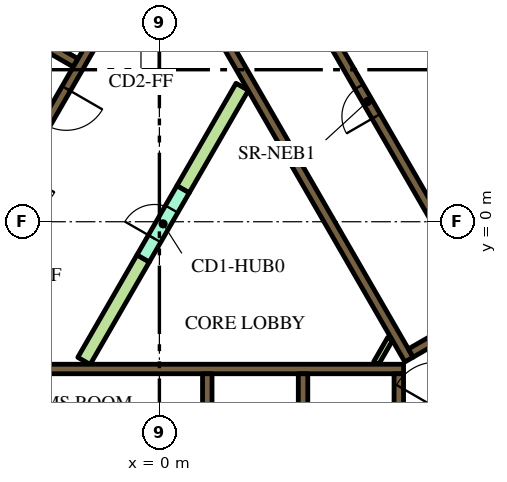
"""IFC4 building model, lengths in metres.
Left out: names, types, materials, properties, quantities, classifications, styles, units other than length and angle.
Written with IfcOpenShell. Run it as: python <this file> out.ifc"""

import sys

from ifc_helpers import new_model, si_unit, direction, frame, frame_2d, origin, place, context, subcontext, project, spatial, polyline, rectangle, outline, extrude, element, fill, save


model = new_model("IFC4")
c1 = context("Model", 3, precision=1e-05, world=origin(), true_north=direction((0.0, 1.0)))
c2 = subcontext(c1, "Body", "Model", "MODEL_VIEW")
j1 = project(units=[si_unit("LENGTHUNIT", "METRE"), si_unit("PLANEANGLEUNIT", "RADIAN")], contexts=[c1])
p1 = place(None, origin())
s1 = spatial("IfcSite", under=j1, at=p1, CompositionType="ELEMENT")
p2 = place(p1, origin())
s2 = spatial("IfcBuilding", under=s1, at=p2, CompositionType="ELEMENT")
p3 = place(p2, frame((0.0, 0.0, 111.0)))
s3 = spatial("IfcBuildingStorey", under=s2, at=p3, CompositionType="ELEMENT", Elevation=111.0)
p4 = place(p3, frame((6.711, 13.476, 0.0), z_axis=(0.0, 0.0, 1.0), x_axis=(0.500002723396, -0.866023831425, 0.0)))
e1 = element("IfcWall", 1, at=p4, inside=s3, PredefinedType="SOLIDWALL", context=c2, shape_type="SweptSolid", body=[
    extrude(rectangle(XDim=20.334, YDim=0.9, at=frame_2d((10.167, 0.0))), origin(), (0.0, 0.0, 1.0), 3.9),
])
p5 = place(p3, frame((-5.545, -3.875, 0.0), z_axis=(0.0, 0.0, 1.0), x_axis=(1.0, 0.0, 0.0)))
e2 = element("IfcWall", 2, at=p5, inside=s3, PredefinedType="SOLIDWALL", context=c2, shape_type="SweptSolid", body=[
    extrude(rectangle(XDim=11.97, YDim=0.25, at=frame_2d((5.985, 0.0))), origin(), (0.0, 0.0, 1.0), 3.9),
])
p6 = place(p3, frame((6.3, -7.268, 0.0), z_axis=(0.0, 0.0, 1.0), x_axis=(0.0, 1.0, 0.0)))
e3 = element("IfcWall", 3, at=p6, inside=s3, PredefinedType="SOLIDWALL", context=c2, shape_type="SweptSolid", body=[
    extrude(rectangle(XDim=3.268, YDim=0.25, at=frame_2d((1.634, 0.0))), origin(), (0.0, 0.0, 1.0), 3.9),
])
for number, where, z_axis, x_axis in (
    (4, (3.78, -4.0, 0.0), (0.0, 0.0, 1.0), (0.0, -1.0, 0.0)),
    (5, (1.26, -4.0, 0.0), (0.0, 0.0, 1.0), (0.0, -1.0, 0.0)),
):
    element("IfcWall", number, at=place(p3, frame(where, z_axis=z_axis, x_axis=x_axis)), inside=s3, PredefinedType="SOLIDWALL", context=c2, shape_type="SweptSolid", body=[
        extrude(rectangle(XDim=2.2, YDim=0.25, at=frame_2d((1.1, 0.0))), origin(), (0.0, 0.0, 1.0), 3.9),
    ])
p7 = place(p3, origin())
e6 = element("IfcWall", 6, at=p7, inside=s3, PredefinedType="SOLIDWALL", context=c2, shape_type="SweptSolid", body=[
    extrude(outline(polyline([(0.566, 6.725), (0.566, 6.875), (0.566, 6.875), (0.565, 6.875), (0.361, 6.875), (0.035, 7.439), (0.252, 7.564), (0.377, 7.348), (6.552, -3.348), (6.677, -3.564), (6.46, -3.689), (0.448, 6.725), (0.565, 6.725), (0.566, 6.725), (0.566, 6.725)])), origin(), (0.0, 0.0, 1.0), 3.9),
])
p8 = place(p3, frame((6.614, -3.456, 0.0), z_axis=(0.0, 0.0, 1.0), x_axis=(0.86602447079, 0.500001615989, 0.0)))
e7 = element("IfcWall", 7, at=p8, inside=s3, PredefinedType="SOLIDWALL", context=c2, shape_type="SweptSolid", body=[
    extrude(rectangle(XDim=3.154, YDim=0.25, at=frame_2d((1.577, 0.0))), origin(), (0.0, 0.0, 1.0), 3.9),
])
p9 = place(p3, frame((-8.06, -1.311, 0.0), z_axis=(0.0, 0.0, 1.0), x_axis=(0.50000273126, 0.866023826885, 0.0)))
e8 = element("IfcWall", 8, at=p9, inside=s3, PredefinedType="SOLIDWALL", context=c2, shape_type="SweptSolid", body=[
    extrude(rectangle(XDim=10.33, YDim=0.25, at=frame_2d((5.165, 0.0))), origin(), (0.0, 0.0, 1.0), 3.9),
])
p10 = place(p3, frame((-2.204, 4.182, 0.0), z_axis=(0.0, 0.0, 1.0), x_axis=(-0.866008176907, 0.50002983664, 0.0)))
e9 = element("IfcWall", 9, at=p10, inside=s3, PredefinedType="SOLIDWALL", context=c2, shape_type="SweptSolid", body=[
    extrude(rectangle(XDim=2.2, YDim=0.25, at=frame_2d((1.1, 0.0))), origin(), (0.0, 0.0, 1.0), 3.9),
])
p11 = place(p3, frame((5.705, -3.718, 0.0), z_axis=(0.0, 0.0, 1.0), x_axis=(0.499962090823, 0.866047289552, 0.0)))
e10 = element("IfcWall", 10, at=p11, inside=s3, PredefinedType="PARTITIONING", context=c2, shape_type="SweptSolid", body=[
    extrude(rectangle(XDim=0.735, YDim=0.15, at=frame_2d((0.367, 0.0))), origin(), (0.0, 0.0, 1.0), 2.75),
])
e11 = element("IfcWall", 11, at=p7, inside=s3, PredefinedType="PARTITIONING", context=c2, shape_type="SweptSolid", body=[
    extrude(outline(polyline([(-0.59, -0.872), (-0.265, -1.059), (-1.822, -3.756), (-2.147, -3.568), (-0.59, -0.872)])), origin(), (0.0, 0.0, 1.0), 2.75),
])
e12 = element("IfcWall", 12, at=p7, inside=s3, PredefinedType="PARTITIONING", context=c2, shape_type="SweptSolid", body=[
    extrude(outline(polyline([(2.017, 3.643), (2.342, 3.456), (0.785, 0.76), (0.46, 0.947), (2.017, 3.643)])), origin(), (0.0, 0.0, 1.0), 2.75),
])
p12 = place(p3, frame((11.553, -0.46, 0.0), z_axis=(0.0, 0.0, 1.0), x_axis=(-0.500006514828, 0.866021642414, 0.0)))
e13 = element("IfcWall", 13, at=p12, inside=s3, PredefinedType="SOLIDWALL", context=c2, shape_type="SweptSolid", body=[
    extrude(rectangle(XDim=12.35, YDim=0.25, at=frame_2d((6.175, 0.0))), origin(), (0.0, 0.0, 1.0), 3.9),
])
p13 = place(p12, frame((0.585, 0.0, 0.0)))
e14 = element("IfcOpeningElement", 14, at=p13, cuts=e13, PredefinedType="OPENING", context=c2, shape_type="SweptSolid", body=[
    extrude(rectangle(XDim=1.1, YDim=2.1, at=frame_2d((0.55, 1.05))), frame((0.0, 0.135, 0.0), z_axis=(0.0, -1.0, 0.0), x_axis=(1.0, 0.0, 0.0)), (0.0, 0.0, 1.0), 0.27),
])
p14 = place(p12, frame((3.105, 0.0, 0.0)))
e15 = element("IfcOpeningElement", 15, at=p14, cuts=e13, PredefinedType="OPENING", context=c2, shape_type="SweptSolid", body=[
    extrude(rectangle(XDim=1.1, YDim=2.1, at=frame_2d((0.55, 1.05))), frame((0.0, 0.135, 0.0), z_axis=(0.0, -1.0, 0.0), x_axis=(1.0, 0.0, 0.0)), (0.0, 0.0, 1.0), 0.27),
])
p15 = place(p12, frame((5.625, 0.0, 0.0)))
e16 = element("IfcOpeningElement", 16, at=p15, cuts=e13, PredefinedType="OPENING", context=c2, shape_type="SweptSolid", body=[
    extrude(rectangle(XDim=1.1, YDim=2.1, at=frame_2d((0.55, 1.05))), frame((0.0, 0.135, 0.0), z_axis=(0.0, -1.0, 0.0), x_axis=(1.0, 0.0, 0.0)), (0.0, 0.0, 1.0), 0.27),
])
p16 = place(p3, frame((8.565, -2.185, 0.0), z_axis=(0.0, 0.0, 1.0), x_axis=(-0.499997954832, 0.866026584559, 0.0)))
e17 = element("IfcWall", 17, at=p16, inside=s3, PredefinedType="SOLIDWALL", context=c2, shape_type="SweptSolid", body=[
    extrude(rectangle(XDim=12.35, YDim=0.25, at=frame_2d((6.175, 0.0))), origin(), (0.0, 0.0, 1.0), 3.9),
])
p17 = place(p16, frame((5.725, 0.0, 0.0)))
e18 = element("IfcOpeningElement", 18, at=p17, cuts=e17, PredefinedType="OPENING", context=c2, shape_type="SweptSolid", body=[
    extrude(rectangle(XDim=0.9, YDim=2.1, at=frame_2d((0.45, 1.05))), frame((0.0, 0.135, 0.0), z_axis=(0.0, -1.0, 0.0), x_axis=(1.0, 0.0, 0.0)), (0.0, 0.0, 1.0), 0.27),
])
p18 = place(p3, frame((-0.898, 6.194, 0.0), z_axis=(0.0, 0.0, 1.0), x_axis=(-0.499996202215, -0.866027596426, 0.0)))
e19 = element("IfcWall", 19, at=p18, inside=s3, PredefinedType="SOLIDWALL", context=c2, shape_type="SweptSolid", body=[
    extrude(rectangle(XDim=9.83, YDim=0.25, at=frame_2d((4.915, 0.0))), origin(), (0.0, 0.0, 1.0), 3.9),
])
p19 = place(p18, frame((0.585, 0.0, 0.0)))
e20 = element("IfcOpeningElement", 20, at=p19, cuts=e19, PredefinedType="OPENING", context=c2, shape_type="SweptSolid", body=[
    extrude(rectangle(XDim=1.1, YDim=2.1, at=frame_2d((0.55, 1.05))), frame((0.0, 0.135, 0.0), z_axis=(0.0, -1.0, 0.0), x_axis=(1.0, 0.0, 0.0)), (0.0, 0.0, 1.0), 0.27),
])
p20 = place(p18, frame((3.105, 0.0, 0.0)))
e21 = element("IfcOpeningElement", 21, at=p20, cuts=e19, PredefinedType="OPENING", context=c2, shape_type="SweptSolid", body=[
    extrude(rectangle(XDim=1.1, YDim=2.1, at=frame_2d((0.55, 1.05))), frame((0.0, 0.135, 0.0), z_axis=(0.0, -1.0, 0.0), x_axis=(1.0, 0.0, 0.0)), (0.0, 0.0, 1.0), 0.27),
])
p21 = place(p18, frame((5.625, 0.0, 0.0)))
e22 = element("IfcOpeningElement", 22, at=p21, cuts=e19, PredefinedType="OPENING", context=c2, shape_type="SweptSolid", body=[
    extrude(rectangle(XDim=1.1, YDim=2.1, at=frame_2d((0.55, 1.05))), frame((0.0, 0.135, 0.0), z_axis=(0.0, -1.0, 0.0), x_axis=(1.0, 0.0, 0.0)), (0.0, 0.0, 1.0), 0.27),
])
p22 = place(p18, frame((8.145, 0.0, 0.0)))
e23 = element("IfcOpeningElement", 23, at=p22, cuts=e19, PredefinedType="OPENING", context=c2, shape_type="SweptSolid", body=[
    extrude(rectangle(XDim=1.1, YDim=2.1, at=frame_2d((0.55, 1.05))), frame((0.0, 0.135, 0.0), z_axis=(0.0, -1.0, 0.0), x_axis=(1.0, 0.0, 0.0)), (0.0, 0.0, 1.0), 0.27),
])
p23 = place(p3, frame((7.053, -5.284, 0.0), z_axis=(0.0, 0.0, 1.0), x_axis=(0.500078061341, 0.865980330357, 0.0)))
e24 = element("IfcWall", 24, at=p23, inside=s3, PredefinedType="SOLIDWALL", context=c2, shape_type="SweptSolid", body=[
    extrude(rectangle(XDim=2.1, YDim=0.4, at=frame_2d((1.05, 0.0))), origin(), (0.0, 0.0, 1.0), 3.9),
])
p24 = place(p23, frame((0.45, 0.0, 0.0)))
e25 = element("IfcOpeningElement", 25, at=p24, cuts=e24, PredefinedType="OPENING", context=c2, shape_type="SweptSolid", body=[
    extrude(rectangle(XDim=1.2, YDim=2.1, at=frame_2d((0.6, 1.05))), frame((0.0, 0.21, 0.0), z_axis=(0.0, -1.0, 0.0), x_axis=(1.0, 0.0, 0.0)), (0.0, 0.0, 1.0), 0.42),
])
p25 = place(p3, frame((-0.427, -0.966, 0.0), z_axis=(0.0, 0.0, 1.0), x_axis=(0.49994051562, 0.866059744384, 0.0)))
e26 = element("IfcWall", 26, at=p25, inside=s3, PredefinedType="PARTITIONING", context=c2, shape_type="SweptSolid", body=[
    extrude(rectangle(XDim=2.1, YDim=0.375, at=frame_2d((1.05, 0.0))), origin(), (0.0, 0.0, 1.0), 2.75),
])
p26 = place(p25, frame((0.6, 0.0, 0.0)))
e27 = element("IfcOpeningElement", 27, at=p26, cuts=e26, PredefinedType="OPENING", context=c2, shape_type="SweptSolid", body=[
    extrude(rectangle(XDim=0.9, YDim=2.1, at=frame_2d((0.45, 1.05))), frame((0.0, 0.198, 0.0), z_axis=(0.0, -1.0, 0.0), x_axis=(1.0, 0.0, 0.0)), (0.0, 0.0, 1.0), 0.395),
])
p27 = place(p3, frame((6.163, 18.475, 0.0), z_axis=(0.0, 0.0, 1.0), x_axis=(0.500001317485, -0.866024643133, 0.0)))
e28 = element("IfcWall", 28, at=p27, inside=s3, PredefinedType="PARTITIONING", context=c2, shape_type="SweptSolid", body=[
    extrude(rectangle(XDim=25.767, YDim=0.15, at=frame_2d((12.883, 0.0))), origin(), (0.0, 0.0, 1.0), 2.75),
])
p28 = place(p27, frame((24.241, 0.0, 0.0)))
e29 = element("IfcOpeningElement", 29, at=p28, cuts=e28, PredefinedType="OPENING", context=c2, shape_type="SweptSolid", body=[
    extrude(rectangle(XDim=1.0, YDim=2.1, at=frame_2d((0.5, 1.05))), frame((0.0, 0.085, 0.0), z_axis=(0.0, -1.0, 0.0), x_axis=(1.0, 0.0, 0.0)), (0.0, 0.0, 1.0), 0.17),
])
p29 = place(p27, frame((13.144, 0.0, 0.0)))
e30 = element("IfcOpeningElement", 30, at=p29, cuts=e28, PredefinedType="OPENING", context=c2, shape_type="SweptSolid", body=[
    extrude(rectangle(XDim=1.0, YDim=2.1, at=frame_2d((0.5, 1.05))), frame((0.0, 0.085, 0.0), z_axis=(0.0, -1.0, 0.0), x_axis=(1.0, 0.0, 0.0)), (0.0, 0.0, 1.0), 0.17),
])
p30 = place(p27, frame((10.874, 0.0, 0.0)))
e31 = element("IfcOpeningElement", 31, at=p30, cuts=e28, PredefinedType="OPENING", context=c2, shape_type="SweptSolid", body=[
    extrude(rectangle(XDim=0.9, YDim=2.1, at=frame_2d((0.45, 1.05))), frame((0.0, 0.085, 0.0), z_axis=(0.0, -1.0, 0.0), x_axis=(1.0, 0.0, 0.0)), (0.0, 0.0, 1.0), 0.17),
])
p31 = place(p27, frame((3.718, 0.0, 0.0)))
e32 = element("IfcOpeningElement", 32, at=p31, cuts=e28, PredefinedType="OPENING", context=c2, shape_type="SweptSolid", body=[
    extrude(rectangle(XDim=1.0, YDim=2.1, at=frame_2d((0.5, 1.05))), frame((0.0, 0.085, 0.0), z_axis=(0.0, -1.0, 0.0), x_axis=(1.0, 0.0, 0.0)), (0.0, 0.0, 1.0), 0.17),
])
p32 = place(p27, frame((2.411, 0.0, 0.0)))
e33 = element("IfcOpeningElement", 33, at=p32, cuts=e28, PredefinedType="OPENING", context=c2, shape_type="SweptSolid", body=[
    extrude(rectangle(XDim=1.0, YDim=2.1, at=frame_2d((0.5, 1.05))), frame((0.0, 0.085, 0.0), z_axis=(0.0, -1.0, 0.0), x_axis=(1.0, 0.0, 0.0)), (0.0, 0.0, 1.0), 0.17),
])
p33 = place(p17, origin())
e34 = element("IfcDoor", 34, at=p33, inside=s3, OperationType="SINGLE_SWING_LEFT", PredefinedType="DOOR", context=c2, shape_type="SweptSolid", body=[
    extrude(rectangle(XDim=0.9, YDim=2.1, at=frame_2d((0.45, 1.05))), frame((0.0, 0.025, 0.0), z_axis=(0.0, -1.0, 0.0), x_axis=(1.0, 0.0, 0.0)), (0.0, 0.0, 1.0), 0.05),
])
fill(e18, e34)
p34 = place(p20, origin())
e35 = element("IfcDoor", 35, at=p34, inside=s3, OperationType="DOUBLE_DOOR_SLIDING", PredefinedType="DOOR", context=c2, shape_type="SweptSolid", body=[
    extrude(rectangle(XDim=1.1, YDim=2.1, at=frame_2d((0.55, 1.05))), frame((0.0, 0.025, 0.0), z_axis=(0.0, -1.0, 0.0), x_axis=(1.0, 0.0, 0.0)), (0.0, 0.0, 1.0), 0.05),
])
fill(e21, e35)
p35 = place(p26, origin())
e36 = element("IfcDoor", 36, at=p35, inside=s3, OperationType="SINGLE_SWING_LEFT", PredefinedType="DOOR", context=c2, shape_type="SweptSolid", body=[
    extrude(rectangle(XDim=0.9, YDim=2.1, at=frame_2d((0.45, 1.05))), frame((0.0, 0.025, 0.0), z_axis=(0.0, -1.0, 0.0), x_axis=(1.0, 0.0, 0.0)), (0.0, 0.0, 1.0), 0.05),
])
fill(e27, e36)
save(model, sys.argv[1])
